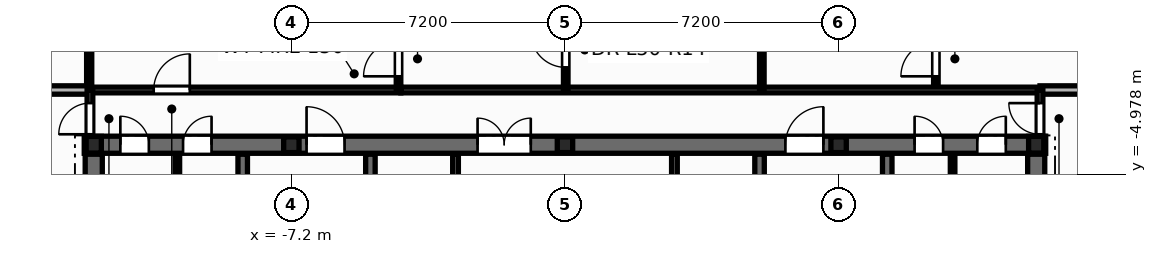
"""IFC4 building model, lengths in metres.
Left out: names, types, materials, properties, quantities, classifications, styles, units other than length and angle.
Written with IfcOpenShell. Run it as: python <this file> out.ifc"""

import sys

from ifc_helpers import new_model, si_unit, direction, frame, frame_2d, origin, origin_2d, place, context, subcontext, project, spatial, rectangle, i_section, extrude, element, fill, save


model = new_model("IFC4")
c1 = context("Model", 3, precision=1e-05, world=origin(), true_north=direction((0.0, 1.0)))
c2 = subcontext(c1, "Body", "Model", "MODEL_VIEW")
j1 = project(units=[si_unit("LENGTHUNIT", "METRE"), si_unit("PLANEANGLEUNIT", "RADIAN")], contexts=[c1])
p1 = place(None, origin())
s1 = spatial("IfcSite", under=j1, at=p1, CompositionType="ELEMENT")
p2 = place(p1, origin())
s2 = spatial("IfcBuilding", under=s1, at=p2, CompositionType="ELEMENT")
p3 = place(p2, frame((0.0, 0.0, 192.9)))
s3 = spatial("IfcBuildingStorey", under=s2, at=p3, CompositionType="ELEMENT", Elevation=192.9)
for number, where, z_axis, x_axis in (
    (1, (12.4, -4.2, 0.0), (0.0, 0.0, 1.0), (1.0, 0.0, 0.0)),
    (2, (-12.4, -4.2, 0.0), (0.0, 0.0, 1.0), (1.0, 0.0, 0.0)),
):
    element("IfcColumn", number, at=place(p3, frame(where, z_axis=z_axis, x_axis=x_axis)), inside=s3, PredefinedType="COLUMN", context=c2, shape_type="SweptSolid", body=[
        extrude(i_section(OverallWidth=0.4, OverallDepth=0.44, WebThickness=0.028, FlangeThickness=0.04, at=origin_2d()), origin(), (0.0, 0.0, 1.0), 3.6),
    ])
for number, where, z_axis, x_axis in (
    (3, (-7.2, -4.2, 0.0), (0.0, 0.0, 1.0), (1.0, 0.0, 0.0)),
    (4, (0.0, -4.2, 0.0), (0.0, 0.0, 1.0), (1.0, 0.0, 0.0)),
    (5, (7.2, -4.2, 0.0), (0.0, 0.0, 1.0), (1.0, 0.0, 0.0)),
):
    element("IfcColumn", number, at=place(p3, frame(where, z_axis=z_axis, x_axis=x_axis)), inside=s3, PredefinedType="PILASTER", context=c2, shape_type="SweptSolid", body=[
        extrude(i_section(OverallWidth=0.405, OverallDepth=0.414, WebThickness=0.022, FlangeThickness=0.032, at=origin_2d()), origin(), (0.0, 0.0, 1.0), 3.6),
    ])
p4 = place(p3, frame((-12.245, 1.475, -0.2), z_axis=(0.0, 0.0, 1.0), x_axis=(-0.583980615351, -0.811767602762, 0.0)))
e6 = element("IfcWall", 6, at=p4, inside=s3, PredefinedType="PARAPET", context=c2, shape_type="SweptSolid", body=[
    extrude(rectangle(XDim=15.123, YDim=0.36, at=frame_2d((7.562, 0.0))), origin(), (0.0, 0.0, 1.0), 0.38),
])
p5 = place(p3, frame((-2.88, -7.1, 0.0), z_axis=(0.0, 0.0, 1.0), x_axis=(0.0, 1.0, 0.0)))
e7 = element("IfcWall", 7, at=p5, inside=s3, PredefinedType="PARTITIONING", context=c2, shape_type="SweptSolid", body=[
    extrude(rectangle(XDim=2.65, YDim=0.15, at=frame_2d((1.325, 0.0))), origin(), (0.0, 0.0, 1.0), 3.35),
])
p6 = place(p5, frame((0.85, 0.0, 0.0)))
e8 = element("IfcOpeningElement", 8, at=p6, cuts=e7, PredefinedType="OPENING", context=c2, shape_type="SweptSolid", body=[
    extrude(rectangle(XDim=0.886, YDim=2.104, at=frame_2d((0.44, 1.052))), frame((0.0, 0.085, 0.0), z_axis=(0.0, -1.0, 0.0), x_axis=(1.0, 0.0, 0.0)), (0.0, 0.0, 1.0), 0.17),
])
p7 = place(p3, frame((2.88, -7.1, 0.0), z_axis=(0.0, 0.0, 1.0), x_axis=(0.0, 1.0, 0.0)))
e9 = element("IfcWall", 9, at=p7, inside=s3, PredefinedType="PARTITIONING", context=c2, shape_type="SweptSolid", body=[
    extrude(rectangle(XDim=2.65, YDim=0.15, at=frame_2d((1.325, 0.0))), origin(), (0.0, 0.0, 1.0), 3.35),
])
p8 = place(p7, frame((0.85, 0.0, 0.0)))
e10 = element("IfcOpeningElement", 10, at=p8, cuts=e9, PredefinedType="OPENING", context=c2, shape_type="SweptSolid", body=[
    extrude(rectangle(XDim=0.886, YDim=2.104, at=frame_2d((0.44, 1.052))), frame((0.0, 0.085, 0.0), z_axis=(0.0, -1.0, 0.0), x_axis=(1.0, 0.0, 0.0)), (0.0, 0.0, 1.0), 0.17),
])
for number, where, z_axis, x_axis in (
    (11, (-10.2, -5.52, 0.0), (0.0, 0.0, 1.0), (0.0, 1.0, 0.0)),
    (12, (10.2, -5.52, 0.0), (0.0, 0.0, 1.0), (0.0, 1.0, 0.0)),
):
    element("IfcWall", number, at=place(p3, frame(where, z_axis=z_axis, x_axis=x_axis)), inside=s3, PredefinedType="PARTITIONING", context=c2, shape_type="SweptSolid", body=[
        extrude(rectangle(XDim=1.12, YDim=0.12, at=frame_2d((0.56, 0.0))), origin(), (0.0, 0.0, 1.0), 3.35),
    ])
p9 = place(p3, frame((-12.65, -4.2, 0.0), z_axis=(0.0, 0.0, 1.0), x_axis=(1.0, 0.0, 0.0)))
e13 = element("IfcWall", 13, at=p9, inside=s3, PredefinedType="SHEAR", context=c2, shape_type="SweptSolid", body=[
    extrude(rectangle(XDim=25.3, YDim=0.45, at=frame_2d((12.65, 0.0))), origin(), (0.0, 0.0, 1.0), 3.6),
])
p10 = place(p9, frame((0.95, 0.0, 0.0)))
e14 = element("IfcOpeningElement", 14, at=p10, cuts=e13, PredefinedType="OPENING", context=c2, shape_type="SweptSolid", body=[
    extrude(rectangle(XDim=0.756, YDim=2.054, at=frame_2d((0.375, 1.027))), frame((0.0, 0.235, 0.0), z_axis=(0.0, -1.0, 0.0), x_axis=(1.0, 0.0, 0.0)), (0.0, 0.0, 1.0), 0.47),
])
p11 = place(p9, frame((2.6, 0.0, 0.0)))
e15 = element("IfcOpeningElement", 15, at=p11, cuts=e13, PredefinedType="OPENING", context=c2, shape_type="SweptSolid", body=[
    extrude(rectangle(XDim=0.756, YDim=2.054, at=frame_2d((0.375, 1.027))), frame((0.0, 0.235, 0.0), z_axis=(0.0, -1.0, 0.0), x_axis=(1.0, 0.0, 0.0)), (0.0, 0.0, 1.0), 0.47),
])
p12 = place(p9, frame((21.85, 0.0, 0.0)))
e16 = element("IfcOpeningElement", 16, at=p12, cuts=e13, PredefinedType="OPENING", context=c2, shape_type="SweptSolid", body=[
    extrude(rectangle(XDim=0.756, YDim=2.054, at=frame_2d((0.375, 1.027))), frame((0.0, 0.235, 0.0), z_axis=(0.0, -1.0, 0.0), x_axis=(1.0, 0.0, 0.0)), (0.0, 0.0, 1.0), 0.47),
])
p13 = place(p9, frame((23.5, 0.0, 0.0)))
e17 = element("IfcOpeningElement", 17, at=p13, cuts=e13, PredefinedType="OPENING", context=c2, shape_type="SweptSolid", body=[
    extrude(rectangle(XDim=0.756, YDim=2.054, at=frame_2d((0.375, 1.027))), frame((0.0, 0.235, 0.0), z_axis=(0.0, -1.0, 0.0), x_axis=(1.0, 0.0, 0.0)), (0.0, 0.0, 1.0), 0.47),
])
p14 = place(p9, frame((5.85, 0.0, 0.0)))
e18 = element("IfcOpeningElement", 18, at=p14, cuts=e13, PredefinedType="OPENING", context=c2, shape_type="SweptSolid", body=[
    extrude(rectangle(XDim=1.006, YDim=2.104, at=frame_2d((0.5, 1.052))), frame((0.0, 0.235, 0.0), z_axis=(0.0, -1.0, 0.0), x_axis=(1.0, 0.0, 0.0)), (0.0, 0.0, 1.0), 0.47),
])
p15 = place(p9, frame((10.35, 0.0, 0.0)))
e19 = element("IfcOpeningElement", 19, at=p15, cuts=e13, PredefinedType="OPENING", context=c2, shape_type="SweptSolid", body=[
    extrude(rectangle(XDim=1.406, YDim=2.154, at=frame_2d((0.7, 1.077))), frame((0.0, 0.235, 0.0), z_axis=(0.0, -1.0, 0.0), x_axis=(1.0, 0.0, 0.0)), (0.0, 0.0, 1.0), 0.47),
])
p16 = place(p9, frame((18.45, 0.0, 0.0)))
e20 = element("IfcOpeningElement", 20, at=p16, cuts=e13, PredefinedType="OPENING", context=c2, shape_type="SweptSolid", body=[
    extrude(rectangle(XDim=1.006, YDim=2.104, at=frame_2d((0.5, 1.052))), frame((0.0, 0.235, 0.0), z_axis=(0.0, -1.0, 0.0), x_axis=(1.0, 0.0, 0.0)), (0.0, 0.0, 1.0), 0.47),
])
p17 = place(p3, frame((-8.48, -13.85, 0.0), z_axis=(0.0, 0.0, 1.0), x_axis=(0.0, 1.0, 0.0)))
e21 = element("IfcWall", 21, at=p17, inside=s3, PredefinedType="SHEAR", context=c2, shape_type="SweptSolid", body=[
    extrude(rectangle(XDim=9.4, YDim=0.25, at=frame_2d((4.7, 0.0))), origin(), (0.0, 0.0, 1.0), 3.6),
])
p18 = place(p17, frame((6.95, 0.0, 0.0)))
e22 = element("IfcOpeningElement", 22, at=p18, cuts=e21, PredefinedType="OPENING", context=c2, shape_type="SweptSolid", body=[
    extrude(rectangle(XDim=1.006, YDim=2.104, at=frame_2d((0.5, 1.052))), frame((0.0, 0.135, 0.0), z_axis=(0.0, -1.0, 0.0), x_axis=(1.0, 0.0, 0.0)), (0.0, 0.0, 1.0), 0.27),
])
p19 = place(p3, frame((8.48, -13.85, 0.0), z_axis=(0.0, 0.0, 1.0), x_axis=(0.0, 1.0, 0.0)))
e23 = element("IfcWall", 23, at=p19, inside=s3, PredefinedType="SHEAR", context=c2, shape_type="SweptSolid", body=[
    extrude(rectangle(XDim=9.4, YDim=0.25, at=frame_2d((4.7, 0.0))), origin(), (0.0, 0.0, 1.0), 3.6),
])
p20 = place(p19, frame((6.95, 0.0, 0.0)))
e24 = element("IfcOpeningElement", 24, at=p20, cuts=e23, PredefinedType="OPENING", context=c2, shape_type="SweptSolid", body=[
    extrude(rectangle(XDim=1.006, YDim=2.104, at=frame_2d((0.5, 1.052))), frame((0.0, 0.135, 0.0), z_axis=(0.0, -1.0, 0.0), x_axis=(1.0, 0.0, 0.0)), (0.0, 0.0, 1.0), 0.27),
])
for number, where, z_axis, x_axis in (
    (25, (-5.12, -13.85, 0.0), (0.0, 0.0, 1.0), (0.0, 1.0, 0.0)),
    (26, (5.12, -13.85, 0.0), (0.0, 0.0, 1.0), (0.0, 1.0, 0.0)),
):
    element("IfcWall", number, at=place(p3, frame(where, z_axis=z_axis, x_axis=x_axis)), inside=s3, PredefinedType="SHEAR", context=c2, shape_type="SweptSolid", body=[
        extrude(rectangle(XDim=9.4, YDim=0.25, at=frame_2d((4.7, 0.0))), origin(), (0.0, 0.0, 1.0), 3.6),
    ])
for number, where, z_axis, x_axis in (
    (27, (-12.4, -13.85, 0.0), (0.0, 0.0, 1.0), (0.0, 1.0, 0.0)),
    (28, (12.4, -13.85, 0.0), (0.0, 0.0, 1.0), (0.0, 1.0, 0.0)),
):
    element("IfcWall", number, at=place(p3, frame(where, z_axis=z_axis, x_axis=x_axis)), inside=s3, PredefinedType="SHEAR", context=c2, shape_type="SweptSolid", body=[
        extrude(rectangle(XDim=9.4, YDim=0.45, at=frame_2d((4.7, 0.0))), origin(), (0.0, 0.0, 1.0), 3.6),
    ])
p21 = place(p3, frame((-12.5, -2.76, 0.0), z_axis=(0.0, 0.0, 1.0), x_axis=(1.0, 0.0, 0.0)))
e29 = element("IfcWall", 29, at=p21, inside=s3, PredefinedType="PARTITIONING", context=c2, shape_type="SweptSolid", body=[
    extrude(rectangle(XDim=8.18, YDim=0.15, at=frame_2d((4.09, 0.0))), origin(), (0.0, 0.0, 1.0), 2.325),
])
p22 = place(p21, frame((1.678, 0.0, 0.0)))
e30 = element("IfcOpeningElement", 30, at=p22, cuts=e29, PredefinedType="OPENING", context=c2, shape_type="SweptSolid", body=[
    extrude(rectangle(XDim=0.956, YDim=2.104, at=frame_2d((0.475, 1.052))), frame((0.0, 0.085, 0.0), z_axis=(0.0, -1.0, 0.0), x_axis=(1.0, 0.0, 0.0)), (0.0, 0.0, 1.0), 0.17),
])
p23 = place(p3, frame((9.76, -2.76, 0.0), z_axis=(0.0, 0.0, 1.0), x_axis=(0.0, 1.0, 0.0)))
e31 = element("IfcWall", 31, at=p23, inside=s3, PredefinedType="PARTITIONING", context=c2, shape_type="SweptSolid", body=[
    extrude(rectangle(XDim=7.416, YDim=0.12, at=frame_2d((3.708, 0.0))), origin(), (0.0, 0.0, 1.0), 2.625),
])
p24 = place(p23, frame((0.36, 0.0, 0.0)))
e32 = element("IfcOpeningElement", 32, at=p24, cuts=e31, PredefinedType="OPENING", context=c2, shape_type="SweptSolid", body=[
    extrude(rectangle(XDim=0.926, YDim=2.104, at=frame_2d((0.46, 1.052))), frame((0.0, 0.07, 0.0), z_axis=(0.0, -1.0, 0.0), x_axis=(1.0, 0.0, 0.0)), (0.0, 0.0, 1.0), 0.14),
])
p25 = place(p3, frame((-4.38, -2.76, 0.0), z_axis=(0.0, 0.0, 1.0), x_axis=(0.0, 1.0, 0.0)))
e33 = element("IfcWall", 33, at=p25, inside=s3, PredefinedType="PARTITIONING", context=c2, shape_type="SweptSolid", body=[
    extrude(rectangle(XDim=6.52, YDim=0.12, at=frame_2d((3.26, 0.0))), origin(), (0.0, 0.0, 1.0), 2.325),
])
p26 = place(p25, frame((0.36, 0.0, 0.0)))
e34 = element("IfcOpeningElement", 34, at=p26, cuts=e33, PredefinedType="OPENING", context=c2, shape_type="SweptSolid", body=[
    extrude(rectangle(XDim=0.926, YDim=2.104, at=frame_2d((0.46, 1.052))), frame((0.0, 0.07, 0.0), z_axis=(0.0, -1.0, 0.0), x_axis=(1.0, 0.0, 0.0)), (0.0, 0.0, 1.0), 0.14),
])
p27 = place(p3, frame((-4.318, -2.76, 0.0), z_axis=(0.0, 0.0, 1.0), x_axis=(1.0, 0.0, 0.0)))
e35 = element("IfcWall", 35, at=p27, inside=s3, PredefinedType="PARTITIONING", context=c2, shape_type="SweptSolid", body=[
    extrude(rectangle(XDim=16.818, YDim=0.15, at=frame_2d((8.409, 0.0))), origin(), (0.0, 0.0, 1.0), 2.325),
])
p28 = place(p3, frame((-12.52, -2.76, 0.0), z_axis=(0.0, 0.0, 1.0), x_axis=(0.0, 1.0, 0.0)))
e36 = element("IfcWall", 36, at=p28, inside=s3, PredefinedType="PARTITIONING", context=c2, shape_type="SweptSolid", body=[
    extrude(rectangle(XDim=3.579, YDim=0.135, at=frame_2d((1.79, 0.0))), origin(), (0.0, 0.0, 1.0), 2.625),
])
p29 = place(p28, frame((1.115, 0.0, 0.0)))
e37 = element("IfcOpeningElement", 37, at=p29, cuts=e36, PredefinedType="OPENING", context=c2, shape_type="SweptSolid", body=[
    extrude(rectangle(XDim=0.856, YDim=2.104, at=frame_2d((0.425, 1.052))), frame((0.0, 0.078, 0.0), z_axis=(0.0, -1.0, 0.0), x_axis=(1.0, 0.0, 0.0)), (0.0, 0.0, 1.0), 0.155),
])
p30 = place(p3, frame((5.18, -2.76, 0.0), z_axis=(0.0, 0.0, 1.0), x_axis=(0.0, 1.0, 0.0)))
e38 = element("IfcWall", 38, at=p30, inside=s3, PredefinedType="PARTITIONING", context=c2, shape_type="SweptSolid", body=[
    extrude(rectangle(XDim=6.52, YDim=0.12, at=frame_2d((3.26, 0.0))), origin(), (0.0, 0.0, 1.0), 2.325),
])
p31 = place(p3, frame((0.02, -2.76, 0.0), z_axis=(0.0, 0.0, 1.0), x_axis=(0.0, 1.0, 0.0)))
e39 = element("IfcWall", 39, at=p31, inside=s3, PredefinedType="PARTITIONING", context=c2, shape_type="SweptSolid", body=[
    extrude(rectangle(XDim=2.938, YDim=0.12, at=frame_2d((1.469, 0.0))), origin(), (0.0, 0.0, 1.0), 2.325),
])
p32 = place(p31, frame((0.595, 0.0, 0.0)))
e40 = element("IfcOpeningElement", 40, at=p32, cuts=e39, PredefinedType="OPENING", context=c2, shape_type="SweptSolid", body=[
    extrude(rectangle(XDim=0.926, YDim=2.104, at=frame_2d((0.46, 1.052))), frame((0.0, 0.07, 0.0), z_axis=(0.0, -1.0, 0.0), x_axis=(1.0, 0.0, 0.0)), (0.0, 0.0, 1.0), 0.14),
])
for number, where, z_axis, x_axis in (
    (41, (-15.095, -2.76, 0.0), (0.0, 0.0, 1.0), (1.0, 0.0, 0.0)),
    (42, (12.5, -2.76, 0.0), (0.0, 0.0, 1.0), (1.0, 0.0, 0.0)),
):
    element("IfcWall", number, at=place(p3, frame(where, z_axis=z_axis, x_axis=x_axis)), inside=s3, PredefinedType="PARTITIONING", context=c2, shape_type="SweptSolid", body=[
        extrude(rectangle(XDim=2.595, YDim=0.22, at=frame_2d((1.297, 0.0))), origin(), (0.0, 0.0, 1.0), 2.625),
    ])
p33 = place(p3, frame((-12.5, -4.24, 0.0), z_axis=(0.0, 0.0, 1.0), x_axis=(0.0, 1.0, 0.0)))
e43 = element("IfcWall", 43, at=p33, inside=s3, PredefinedType="PARTITIONING", context=c2, shape_type="SweptSolid", body=[
    extrude(rectangle(XDim=1.48, YDim=0.15, at=frame_2d((0.74, 0.0))), origin(), (0.0, 0.0, 1.0), 2.325),
])
p34 = place(p33, frame((0.315, 0.0, 0.0)))
e44 = element("IfcOpeningElement", 44, at=p34, cuts=e43, PredefinedType="OPENING", context=c2, shape_type="SweptSolid", body=[
    extrude(rectangle(XDim=0.826, YDim=2.104, at=frame_2d((0.41, 1.052))), frame((0.0, 0.085, 0.0), z_axis=(0.0, -1.0, 0.0), x_axis=(1.0, 0.0, 0.0)), (0.0, 0.0, 1.0), 0.17),
])
p35 = place(p3, frame((12.5, -4.24, 0.0), z_axis=(0.0, 0.0, 1.0), x_axis=(0.0, 1.0, 0.0)))
e45 = element("IfcWall", 45, at=p35, inside=s3, PredefinedType="PARTITIONING", context=c2, shape_type="SweptSolid", body=[
    extrude(rectangle(XDim=1.48, YDim=0.15, at=frame_2d((0.74, 0.0))), origin(), (0.0, 0.0, 1.0), 2.325),
])
p36 = place(p35, frame((0.315, 0.0, 0.0)))
e46 = element("IfcOpeningElement", 46, at=p36, cuts=e45, PredefinedType="OPENING", context=c2, shape_type="SweptSolid", body=[
    extrude(rectangle(XDim=0.826, YDim=2.104, at=frame_2d((0.41, 1.052))), frame((0.0, 0.085, 0.0), z_axis=(0.0, -1.0, 0.0), x_axis=(1.0, 0.0, 0.0)), (0.0, 0.0, 1.0), 0.17),
])
p37 = place(p10, origin())
e47 = element("IfcDoor", 47, at=p37, inside=s3, OperationType="SINGLE_SWING_LEFT", PredefinedType="DOOR", context=c2, shape_type="SweptSolid", body=[
    extrude(rectangle(XDim=0.75, YDim=2.05, at=frame_2d((0.375, 1.025))), frame((0.0, 0.025, 0.0), z_axis=(0.0, -1.0, 0.0), x_axis=(1.0, 0.0, 0.0)), (0.0, 0.0, 1.0), 0.05),
])
fill(e14, e47)
p38 = place(p11, origin())
e48 = element("IfcDoor", 48, at=p38, inside=s3, OperationType="SINGLE_SWING_RIGHT", PredefinedType="DOOR", context=c2, shape_type="SweptSolid", body=[
    extrude(rectangle(XDim=0.75, YDim=2.05, at=frame_2d((0.375, 1.025))), frame((0.0, 0.025, 0.0), z_axis=(0.0, -1.0, 0.0), x_axis=(1.0, 0.0, 0.0)), (0.0, 0.0, 1.0), 0.05),
])
fill(e15, e48)
p39 = place(p12, origin())
e49 = element("IfcDoor", 49, at=p39, inside=s3, OperationType="SINGLE_SWING_LEFT", PredefinedType="DOOR", context=c2, shape_type="SweptSolid", body=[
    extrude(rectangle(XDim=0.75, YDim=2.05, at=frame_2d((0.375, 1.025))), frame((0.0, 0.025, 0.0), z_axis=(0.0, -1.0, 0.0), x_axis=(1.0, 0.0, 0.0)), (0.0, 0.0, 1.0), 0.05),
])
fill(e16, e49)
p40 = place(p13, origin())
e50 = element("IfcDoor", 50, at=p40, inside=s3, OperationType="SINGLE_SWING_RIGHT", PredefinedType="DOOR", context=c2, shape_type="SweptSolid", body=[
    extrude(rectangle(XDim=0.75, YDim=2.05, at=frame_2d((0.375, 1.025))), frame((0.0, 0.025, 0.0), z_axis=(0.0, -1.0, 0.0), x_axis=(1.0, 0.0, 0.0)), (0.0, 0.0, 1.0), 0.05),
])
fill(e17, e50)
p41 = place(p14, origin())
e51 = element("IfcDoor", 51, at=p41, inside=s3, OperationType="SINGLE_SWING_LEFT", PredefinedType="DOOR", context=c2, shape_type="SweptSolid", body=[
    extrude(rectangle(XDim=1.0, YDim=2.1, at=frame_2d((0.5, 1.05))), frame((0.0, 0.025, 0.0), z_axis=(0.0, -1.0, 0.0), x_axis=(1.0, 0.0, 0.0)), (0.0, 0.0, 1.0), 0.05),
])
fill(e18, e51)
p42 = place(p15, origin())
e52 = element("IfcDoor", 52, at=p42, inside=s3, OperationType="DOUBLE_DOOR_SINGLE_SWING", PredefinedType="DOOR", context=c2, shape_type="SweptSolid", body=[
    extrude(rectangle(XDim=1.4, YDim=2.15, at=frame_2d((0.7, 1.075))), frame((0.0, 0.025, 0.0), z_axis=(0.0, -1.0, 0.0), x_axis=(1.0, 0.0, 0.0)), (0.0, 0.0, 1.0), 0.05),
])
fill(e19, e52)
p43 = place(p16, origin())
e53 = element("IfcDoor", 53, at=p43, inside=s3, OperationType="SINGLE_SWING_RIGHT", PredefinedType="DOOR", context=c2, shape_type="SweptSolid", body=[
    extrude(rectangle(XDim=1.0, YDim=2.1, at=frame_2d((0.5, 1.05))), frame((0.0, 0.025, 0.0), z_axis=(0.0, -1.0, 0.0), x_axis=(1.0, 0.0, 0.0)), (0.0, 0.0, 1.0), 0.05),
])
fill(e20, e53)
p44 = place(p34, origin())
e54 = element("IfcDoor", 54, at=p44, inside=s3, OperationType="SINGLE_SWING_LEFT", PredefinedType="DOOR", context=c2, shape_type="SweptSolid", body=[
    extrude(rectangle(XDim=0.82, YDim=2.1, at=frame_2d((0.41, 1.05))), frame((0.0, 0.025, 0.0), z_axis=(0.0, -1.0, 0.0), x_axis=(1.0, 0.0, 0.0)), (0.0, 0.0, 1.0), 0.05),
])
fill(e44, e54)
p45 = place(p36, origin())
e55 = element("IfcDoor", 55, at=p45, inside=s3, OperationType="SINGLE_SWING_RIGHT", PredefinedType="DOOR", context=c2, shape_type="SweptSolid", body=[
    extrude(rectangle(XDim=0.82, YDim=2.1, at=frame_2d((0.41, 1.05))), frame((0.0, 0.025, 0.0), z_axis=(0.0, -1.0, 0.0), x_axis=(1.0, 0.0, 0.0)), (0.0, 0.0, 1.0), 0.05),
])
fill(e46, e55)
p46 = place(p22, origin())
e56 = element("IfcDoor", 56, at=p46, inside=s3, OperationType="SINGLE_SWING_RIGHT", PredefinedType="DOOR", context=c2, shape_type="SweptSolid", body=[
    extrude(rectangle(XDim=0.95, YDim=2.1, at=frame_2d((0.475, 1.05))), frame((0.0, 0.025, 0.0), z_axis=(0.0, -1.0, 0.0), x_axis=(1.0, 0.0, 0.0)), (0.0, 0.0, 1.0), 0.05),
])
fill(e30, e56)
p47 = place(p26, origin())
e57 = element("IfcDoor", 57, at=p47, inside=s3, OperationType="SINGLE_SWING_LEFT", PredefinedType="DOOR", context=c2, shape_type="SweptSolid", body=[
    extrude(rectangle(XDim=0.92, YDim=2.1, at=frame_2d((0.46, 1.05))), frame((0.0, 0.025, 0.0), z_axis=(0.0, -1.0, 0.0), x_axis=(1.0, 0.0, 0.0)), (0.0, 0.0, 1.0), 0.05),
])
fill(e34, e57)
p48 = place(p32, origin())
e58 = element("IfcDoor", 58, at=p48, inside=s3, OperationType="SINGLE_SWING_RIGHT", PredefinedType="DOOR", context=c2, shape_type="SweptSolid", body=[
    extrude(rectangle(XDim=0.92, YDim=2.1, at=frame_2d((0.46, 1.05))), frame((0.0, 0.025, 0.0), z_axis=(0.0, -1.0, 0.0), x_axis=(1.0, 0.0, 0.0)), (0.0, 0.0, 1.0), 0.05),
])
fill(e40, e58)
p49 = place(p24, origin())
e59 = element("IfcDoor", 59, at=p49, inside=s3, OperationType="SINGLE_SWING_LEFT", PredefinedType="DOOR", context=c2, shape_type="SweptSolid", body=[
    extrude(rectangle(XDim=0.92, YDim=2.1, at=frame_2d((0.46, 1.05))), frame((0.0, 0.025, 0.0), z_axis=(0.0, -1.0, 0.0), x_axis=(1.0, 0.0, 0.0)), (0.0, 0.0, 1.0), 0.05),
])
fill(e32, e59)
save(model, sys.argv[1])
